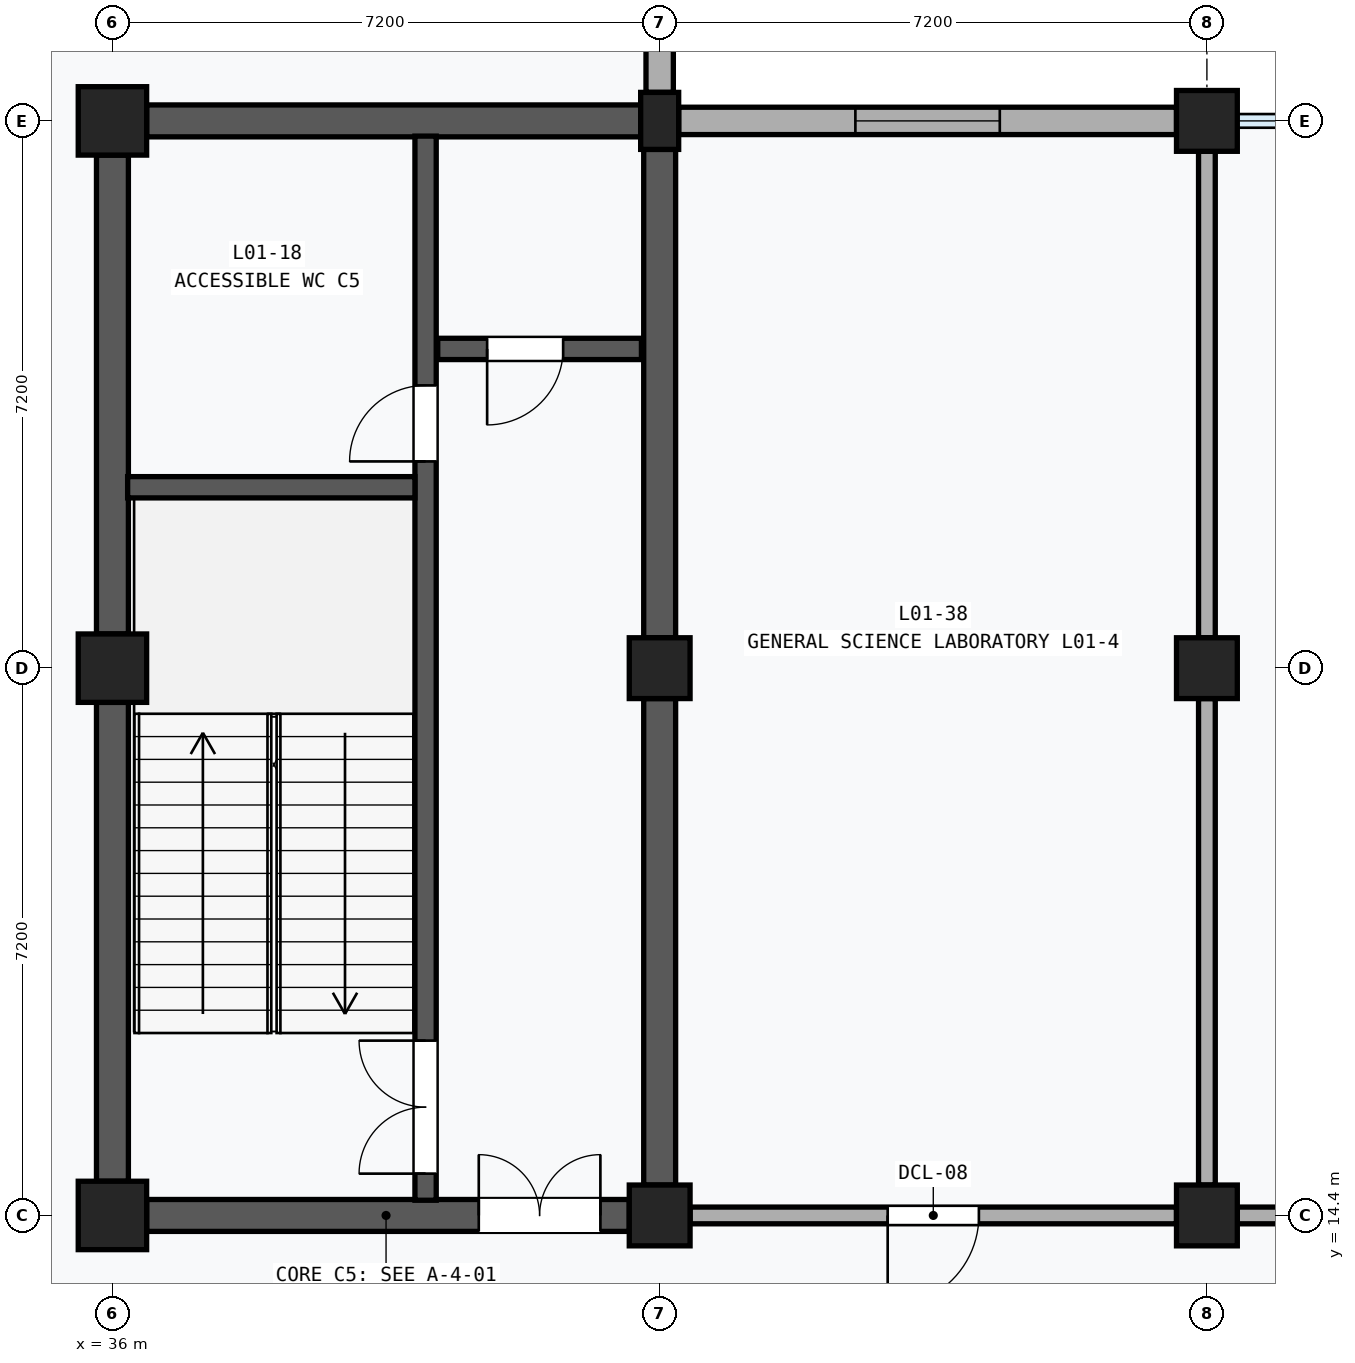
"""IFC4 building model, lengths in metres.
Left out: names, types, materials, properties, quantities, classifications, styles, units other than length and angle.
Written with IfcOpenShell. Run it as: python <this file> out.ifc"""

import sys

from ifc_helpers import new_model, si_unit, direction, frame, frame_2d, origin, origin_2d, place, context, subcontext, project, spatial, rectangle, extrude, element, fill, save


model = new_model("IFC4")
c1 = context("Model", 3, precision=1e-05, world=origin(), true_north=direction((0.0, 1.0)))
c2 = subcontext(c1, "Body", "Model", "MODEL_VIEW")
j1 = project(units=[si_unit("LENGTHUNIT", "METRE"), si_unit("PLANEANGLEUNIT", "RADIAN")], contexts=[c1])
p1 = place(None, origin())
s1 = spatial("IfcSite", under=j1, at=p1, CompositionType="ELEMENT")
p2 = place(p1, origin())
s2 = spatial("IfcBuilding", under=s1, at=p2, CompositionType="ELEMENT")
p3 = place(p2, frame((0.0, 0.0, 4.8)))
s3 = spatial("IfcBuildingStorey", under=s2, at=p3, CompositionType="ELEMENT", Elevation=4.8)
for number, where, z_axis, x_axis in (
    (1, (36.0, 14.4, 0.0), (0.0, 0.0, 1.0), (1.0, 0.0, 0.0)),
    (2, (36.0, 21.6, 0.0), (0.0, 0.0, 1.0), (1.0, 0.0, 0.0)),
    (3, (36.0, 28.8, 0.0), (0.0, 0.0, 1.0), (1.0, 0.0, 0.0)),
):
    element("IfcColumn", number, at=place(p3, frame(where, z_axis=z_axis, x_axis=x_axis)), inside=s3, PredefinedType="COLUMN", context=c2, shape_type="SweptSolid", body=[
        extrude(rectangle(XDim=0.9, YDim=0.9, at=origin_2d()), origin(), (0.0, 0.0, 1.0), 4.8),
    ])
for number, where, z_axis, x_axis in (
    (4, (43.2, 14.4, 0.0), (0.0, 0.0, 1.0), (1.0, 0.0, 0.0)),
    (5, (43.2, 21.6, 0.0), (0.0, 0.0, 1.0), (1.0, 0.0, 0.0)),
):
    element("IfcColumn", number, at=place(p3, frame(where, z_axis=z_axis, x_axis=x_axis)), inside=s3, PredefinedType="COLUMN", context=c2, shape_type="SweptSolid", body=[
        extrude(rectangle(XDim=0.8, YDim=0.8, at=origin_2d()), origin(), (0.0, 0.0, 1.0), 4.8),
    ])
p4 = place(p3, frame((43.2, 28.8, 0.0), z_axis=(0.0, 0.0, 1.0), x_axis=(1.0, 0.0, 0.0)))
e6 = element("IfcColumn", 6, at=p4, inside=s3, PredefinedType="PILASTER", context=c2, shape_type="SweptSolid", body=[
    extrude(rectangle(XDim=0.5, YDim=0.75, at=origin_2d()), origin(), (0.0, 0.0, 1.0), 4.8),
])
for number, where, z_axis, x_axis in (
    (7, (50.4, 14.4, 0.0), (0.0, 0.0, 1.0), (1.0, 0.0, 0.0)),
    (8, (50.4, 21.6, 0.0), (0.0, 0.0, 1.0), (1.0, 0.0, 0.0)),
    (9, (50.4, 28.8, 0.0), (0.0, 0.0, 1.0), (1.0, 0.0, 0.0)),
):
    element("IfcColumn", number, at=place(p3, frame(where, z_axis=z_axis, x_axis=x_axis)), inside=s3, PredefinedType="COLUMN", context=c2, shape_type="SweptSolid", body=[
        extrude(rectangle(XDim=0.8, YDim=0.8, at=origin_2d()), origin(), (0.0, 0.0, 1.0), 4.8),
    ])
p5 = place(p3, frame((43.2, 29.175, 0.0), z_axis=(0.0, 0.0, 1.0), x_axis=(0.0, 1.0, 0.0)))
e10 = element("IfcWall", 10, at=p5, inside=s3, PredefinedType="SOLIDWALL", context=c2, shape_type="SweptSolid", body=[
    extrude(rectangle(XDim=6.425, YDim=0.36, at=frame_2d((3.212, 0.0))), origin(), (0.0, 0.0, 1.0), 3.85),
])
p6 = place(p5, frame((2.262, 0.0, 1.1)))
e11 = element("IfcOpeningElement", 11, at=p6, cuts=e10, PredefinedType="OPENING", context=c2, shape_type="SweptSolid", body=[
    extrude(rectangle(XDim=1.9, YDim=1.5, at=frame_2d((0.95, 0.75))), frame((0.0, 0.192, 0.0), z_axis=(0.0, -1.0, 0.0), x_axis=(1.0, 0.0, 0.0)), (0.0, 0.0, 1.0), 0.384),
])
p7 = place(p3, frame((43.45, 28.8, 0.0), z_axis=(0.0, 0.0, 1.0), x_axis=(1.0, 0.0, 0.0)))
e12 = element("IfcWall", 12, at=p7, inside=s3, PredefinedType="SOLIDWALL", context=c2, shape_type="SweptSolid", body=[
    extrude(rectangle(XDim=6.55, YDim=0.36, at=frame_2d((3.275, 0.0))), origin(), (0.0, 0.0, 1.0), 3.85),
])
p8 = place(p7, frame((2.325, 0.0, 1.1)))
e13 = element("IfcOpeningElement", 13, at=p8, cuts=e12, PredefinedType="OPENING", context=c2, shape_type="SweptSolid", body=[
    extrude(rectangle(XDim=1.9, YDim=1.5, at=frame_2d((0.95, 0.75))), frame((0.0, 0.192, 0.0), z_axis=(0.0, -1.0, 0.0), x_axis=(1.0, 0.0, 0.0)), (0.0, 0.0, 1.0), 0.384),
])
p9 = place(p3, frame((36.0, 14.85, 0.0), z_axis=(0.0, 0.0, 1.0), x_axis=(0.0, 1.0, 0.0)))
e14 = element("IfcWall", 14, at=p9, inside=s3, PredefinedType="SHEAR", context=c2, shape_type="SweptSolid", body=[
    extrude(rectangle(XDim=6.3, YDim=0.42, at=frame_2d((3.15, 0.0))), origin(), (0.0, 0.0, 1.0), 3.58),
])
p10 = place(p3, frame((36.0, 22.05, 0.0), z_axis=(0.0, 0.0, 1.0), x_axis=(0.0, 1.0, 0.0)))
e15 = element("IfcWall", 15, at=p10, inside=s3, PredefinedType="SHEAR", context=c2, shape_type="SweptSolid", body=[
    extrude(rectangle(XDim=6.3, YDim=0.42, at=frame_2d((3.15, 0.0))), origin(), (0.0, 0.0, 1.0), 3.58),
])
p11 = place(p3, frame((43.2, 14.8, 0.0), z_axis=(0.0, 0.0, 1.0), x_axis=(0.0, 1.0, 0.0)))
e16 = element("IfcWall", 16, at=p11, inside=s3, PredefinedType="SHEAR", context=c2, shape_type="SweptSolid", body=[
    extrude(rectangle(XDim=6.4, YDim=0.42, at=frame_2d((3.2, 0.0))), origin(), (0.0, 0.0, 1.0), 3.58),
])
p12 = place(p3, frame((43.2, 22.0, 0.0), z_axis=(0.0, 0.0, 1.0), x_axis=(0.0, 1.0, 0.0)))
e17 = element("IfcWall", 17, at=p12, inside=s3, PredefinedType="SHEAR", context=c2, shape_type="SweptSolid", body=[
    extrude(rectangle(XDim=6.425, YDim=0.42, at=frame_2d((3.212, 0.0))), origin(), (0.0, 0.0, 1.0), 3.58),
])
p13 = place(p3, frame((36.45, 14.4, 0.0), z_axis=(0.0, 0.0, 1.0), x_axis=(1.0, 0.0, 0.0)))
e18 = element("IfcWall", 18, at=p13, inside=s3, PredefinedType="SHEAR", context=c2, shape_type="SweptSolid", body=[
    extrude(rectangle(XDim=6.35, YDim=0.42, at=frame_2d((3.175, 0.0))), origin(), (0.0, 0.0, 1.0), 3.58),
])
p14 = place(p13, frame((4.37, 0.0, 0.0)))
e19 = element("IfcOpeningElement", 19, at=p14, cuts=e18, PredefinedType="OPENING", context=c2, shape_type="SweptSolid", body=[
    extrude(rectangle(XDim=1.6, YDim=2.2, at=frame_2d((0.8, 1.1))), frame((0.0, 0.222, 0.0), z_axis=(0.0, -1.0, 0.0), x_axis=(1.0, 0.0, 0.0)), (0.0, 0.0, 1.0), 0.444),
])
p15 = place(p3, frame((36.45, 28.8, 0.0), z_axis=(0.0, 0.0, 1.0), x_axis=(1.0, 0.0, 0.0)))
e20 = element("IfcWall", 20, at=p15, inside=s3, PredefinedType="SHEAR", context=c2, shape_type="SweptSolid", body=[
    extrude(rectangle(XDim=6.5, YDim=0.42, at=frame_2d((3.25, 0.0))), origin(), (0.0, 0.0, 1.0), 3.58),
])
p16 = place(p3, frame((40.12, 14.6, 0.0), z_axis=(0.0, 0.0, 1.0), x_axis=(0.0, 1.0, 0.0)))
e21 = element("IfcWall", 21, at=p16, inside=s3, PredefinedType="SHEAR", context=c2, shape_type="SweptSolid", body=[
    extrude(rectangle(XDim=14.0, YDim=0.28, at=frame_2d((7.0, 0.0))), origin(), (0.0, 0.0, 1.0), 4.48),
])
p17 = place(p16, frame((0.35, 0.0, 0.0)))
e22 = element("IfcOpeningElement", 22, at=p17, cuts=e21, PredefinedType="OPENING", context=c2, shape_type="SweptSolid", body=[
    extrude(rectangle(XDim=1.75, YDim=2.15, at=frame_2d((0.875, 1.075))), frame((0.0, 0.152, 0.0), z_axis=(0.0, -1.0, 0.0), x_axis=(1.0, 0.0, 0.0)), (0.0, 0.0, 1.0), 0.304),
])
p18 = place(p16, frame((9.72, 0.0, 0.0)))
e23 = element("IfcOpeningElement", 23, at=p18, cuts=e21, PredefinedType="OPENING", context=c2, shape_type="SweptSolid", body=[
    extrude(rectangle(XDim=1.0, YDim=2.15, at=frame_2d((0.5, 1.075))), frame((0.0, 0.152, 0.0), z_axis=(0.0, -1.0, 0.0), x_axis=(1.0, 0.0, 0.0)), (0.0, 0.0, 1.0), 0.304),
])
p19 = place(p3, frame((36.2, 23.98, 0.0), z_axis=(0.0, 0.0, 1.0), x_axis=(1.0, 0.0, 0.0)))
e24 = element("IfcWall", 24, at=p19, inside=s3, PredefinedType="SHEAR", context=c2, shape_type="SweptSolid", body=[
    extrude(rectangle(XDim=3.78, YDim=0.28, at=frame_2d((1.89, 0.0))), origin(), (0.0, 0.0, 1.0), 4.48),
])
p20 = place(p3, frame((40.28, 25.8, 0.0), z_axis=(0.0, 0.0, 1.0), x_axis=(1.0, 0.0, 0.0)))
e25 = element("IfcWall", 25, at=p20, inside=s3, PredefinedType="SHEAR", context=c2, shape_type="SweptSolid", body=[
    extrude(rectangle(XDim=2.68, YDim=0.28, at=frame_2d((1.34, 0.0))), origin(), (0.0, 0.0, 1.0), 4.48),
])
p21 = place(p20, frame((0.65, 0.0, 0.0)))
e26 = element("IfcOpeningElement", 26, at=p21, cuts=e25, PredefinedType="OPENING", context=c2, shape_type="SweptSolid", body=[
    extrude(rectangle(XDim=1.0, YDim=2.15, at=frame_2d((0.5, 1.075))), frame((0.0, 0.152, 0.0), z_axis=(0.0, -1.0, 0.0), x_axis=(1.0, 0.0, 0.0)), (0.0, 0.0, 1.0), 0.304),
])
p22 = place(p3, frame((43.6, 14.4, 0.0), z_axis=(0.0, 0.0, 1.0), x_axis=(1.0, 0.0, 0.0)))
e27 = element("IfcWall", 27, at=p22, inside=s3, PredefinedType="PARTITIONING", context=c2, shape_type="SweptSolid", body=[
    extrude(rectangle(XDim=6.4, YDim=0.22, at=frame_2d((3.2, 0.0))), origin(), (0.0, 0.0, 1.0), 3.58),
])
p23 = place(p22, frame((2.6, 0.0, 0.0)))
e28 = element("IfcOpeningElement", 28, at=p23, cuts=e27, PredefinedType="OPENING", context=c2, shape_type="SweptSolid", body=[
    extrude(rectangle(XDim=1.2, YDim=2.24, at=frame_2d((0.6, 1.12))), frame((0.0, 0.122, 0.0), z_axis=(0.0, -1.0, 0.0), x_axis=(1.0, 0.0, 0.0)), (0.0, 0.0, 1.0), 0.244),
])
for number, where, z_axis, x_axis in (
    (29, (50.4, 14.8, 0.0), (0.0, 0.0, 1.0), (0.0, 1.0, 0.0)),
    (30, (50.4, 22.0, 0.0), (0.0, 0.0, 1.0), (0.0, 1.0, 0.0)),
):
    element("IfcWall", number, at=place(p3, frame(where, z_axis=z_axis, x_axis=x_axis)), inside=s3, PredefinedType="PARTITIONING", context=c2, shape_type="SweptSolid", body=[
        extrude(rectangle(XDim=6.4, YDim=0.22, at=frame_2d((3.2, 0.0))), origin(), (0.0, 0.0, 1.0), 3.58),
    ])
p24 = place(p3, frame((50.8, 14.4, 0.0), z_axis=(0.0, 0.0, 1.0), x_axis=(1.0, 0.0, 0.0)))
e31 = element("IfcWall", 31, at=p24, inside=s3, PredefinedType="PARTITIONING", context=c2, shape_type="SweptSolid", body=[
    extrude(rectangle(XDim=6.4, YDim=0.22, at=frame_2d((3.2, 0.0))), origin(), (0.0, 0.0, 1.0), 3.58),
])
p25 = place(p24, frame((2.58, 0.0, 0.0)))
e32 = element("IfcOpeningElement", 32, at=p25, cuts=e31, PredefinedType="OPENING", context=c2, shape_type="SweptSolid", body=[
    extrude(rectangle(XDim=1.24, YDim=2.26, at=frame_2d((0.62, 1.13))), frame((0.0, 0.122, 0.0), z_axis=(0.0, -1.0, 0.0), x_axis=(1.0, 0.0, 0.0)), (0.0, 0.0, 1.0), 0.244),
])
p26 = place(p8, origin())
e33 = element("IfcWindow", 33, at=p26, inside=s3, PartitioningType="SINGLE_PANEL", PredefinedType="WINDOW", context=c2, shape_type="SweptSolid", body=[
    extrude(rectangle(XDim=1.9, YDim=1.5, at=frame_2d((0.95, 0.75))), frame((0.0, 0.03, 0.0), z_axis=(0.0, -1.0, 0.0), x_axis=(1.0, 0.0, 0.0)), (0.0, 0.0, 1.0), 0.06),
])
fill(e13, e33)
p27 = place(p14, origin())
e34 = element("IfcDoor", 34, at=p27, inside=s3, OperationType="DOUBLE_DOOR_SINGLE_SWING", PredefinedType="DOOR", context=c2, shape_type="SweptSolid", body=[
    extrude(rectangle(XDim=1.6, YDim=2.2, at=frame_2d((0.8, 1.1))), frame((0.0, 0.025, 0.0), z_axis=(0.0, -1.0, 0.0), x_axis=(1.0, 0.0, 0.0)), (0.0, 0.0, 1.0), 0.05),
])
fill(e19, e34)
p28 = place(p17, origin())
e35 = element("IfcDoor", 35, at=p28, inside=s3, OperationType="DOUBLE_DOOR_SINGLE_SWING", PredefinedType="DOOR", context=c2, shape_type="SweptSolid", body=[
    extrude(rectangle(XDim=1.75, YDim=2.15, at=frame_2d((0.875, 1.075))), frame((0.0, 0.025, 0.0), z_axis=(0.0, -1.0, 0.0), x_axis=(1.0, 0.0, 0.0)), (0.0, 0.0, 1.0), 0.05),
])
fill(e22, e35)
p29 = place(p18, origin())
e36 = element("IfcDoor", 36, at=p29, inside=s3, OperationType="SINGLE_SWING_LEFT", PredefinedType="DOOR", context=c2, shape_type="SweptSolid", body=[
    extrude(rectangle(XDim=1.0, YDim=2.15, at=frame_2d((0.5, 1.075))), frame((0.0, 0.025, 0.0), z_axis=(0.0, -1.0, 0.0), x_axis=(1.0, 0.0, 0.0)), (0.0, 0.0, 1.0), 0.05),
])
fill(e23, e36)
p30 = place(p21, frame((1.0, 0.0, 0.0), z_axis=(0.0, 0.0, 1.0), x_axis=(-1.0, 0.0, 0.0)))
e37 = element("IfcDoor", 37, at=p30, inside=s3, OperationType="SINGLE_SWING_RIGHT", PredefinedType="DOOR", context=c2, shape_type="SweptSolid", body=[
    extrude(rectangle(XDim=1.0, YDim=2.15, at=frame_2d((0.5, 1.075))), frame((0.0, 0.025, 0.0), z_axis=(0.0, -1.0, 0.0), x_axis=(1.0, 0.0, 0.0)), (0.0, 0.0, 1.0), 0.05),
])
fill(e26, e37)
p31 = place(p23, frame((1.2, 0.0, 0.0), z_axis=(0.0, 0.0, 1.0), x_axis=(-1.0, 0.0, 0.0)))
e38 = element("IfcDoor", 38, at=p31, inside=s3, OperationType="SINGLE_SWING_RIGHT", PredefinedType="DOOR", context=c2, shape_type="SweptSolid", body=[
    extrude(rectangle(XDim=1.2, YDim=2.24, at=frame_2d((0.6, 1.12))), frame((0.0, 0.025, 0.0), z_axis=(0.0, -1.0, 0.0), x_axis=(1.0, 0.0, 0.0)), (0.0, 0.0, 1.0), 0.05),
])
fill(e28, e38)
save(model, sys.argv[1])
